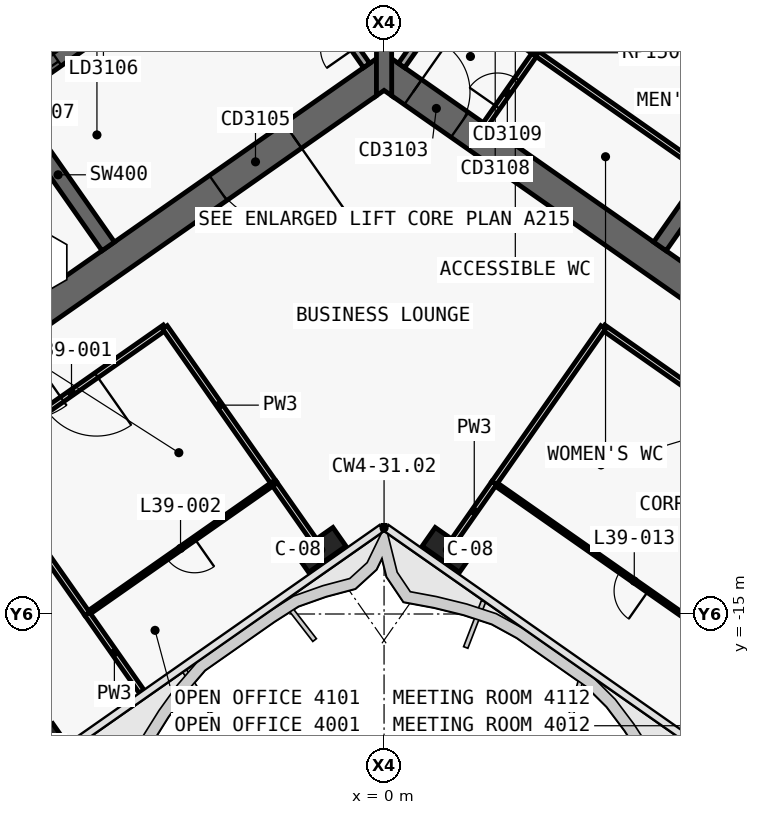
"""IFC4 building model, lengths in metres.
Left out: names, types, materials, properties, quantities, classifications, styles, units other than length and angle.
Written with IfcOpenShell. Run it as: python <this file> out.ifc"""

import sys

from ifc_helpers import new_model, si_unit, direction, frame, frame_2d, origin, origin_2d, place, context, subcontext, project, spatial, polyline, rectangle, outline, extrude, element, fill, save


model = new_model("IFC4")
c1 = context("Model", 3, precision=1e-05, world=origin(), true_north=direction((0.0, 1.0)))
c2 = subcontext(c1, "Body", "Model", "MODEL_VIEW")
j1 = project(units=[si_unit("LENGTHUNIT", "METRE"), si_unit("PLANEANGLEUNIT", "RADIAN")], contexts=[c1])
p1 = place(None, origin())
s1 = spatial("IfcSite", under=j1, at=p1, CompositionType="ELEMENT")
p2 = place(p1, origin())
s2 = spatial("IfcBuilding", under=s1, at=p2, CompositionType="ELEMENT")
p3 = place(p2, frame((0.0, 0.0, 171.0)))
s3 = spatial("IfcBuildingStorey", under=s2, at=p3, CompositionType="ELEMENT", Elevation=171.0)
p4 = place(p3, frame((0.029, 11.984, 0.0), z_axis=(0.0, 0.0, 1.0), x_axis=(-0.819151382952, -0.573577380837, 0.0)))
e1 = element("IfcWall", 1, at=p4, inside=s3, PredefinedType="SHEAR", context=c2, shape_type="SweptSolid", body=[
    extrude(outline(polyline([(33.898, 0.4), (0.56, 0.4), (-0.0, -0.4), (33.898, -0.4), (33.898, 0.4)])), origin(), (0.0, 0.0, 1.0), 3.9),
])
p5 = place(p3, frame((0.029, -0.712, 0.0), z_axis=(0.0, 0.0, 1.0), x_axis=(-0.819151758019, -0.573576845187, 0.0)))
e2 = element("IfcWall", 2, at=p5, inside=s3, PredefinedType="SHEAR", context=c2, shape_type="SweptSolid", body=[
    extrude(outline(polyline([(26.616, 0.4), (0.56, 0.4), (-0.0, -0.4), (26.616, -0.4), (26.616, 0.4)])), origin(), (0.0, 0.0, 1.0), 3.9),
])
p6 = place(p5, frame((2.966, 0.0, 0.0)))
e3 = element("IfcOpeningElement", 3, at=p6, cuts=e2, PredefinedType="OPENING", context=c2, shape_type="SweptSolid", body=[
    extrude(rectangle(XDim=2.4, YDim=2.1, at=frame_2d((1.2, 1.05))), frame((0.0, 0.41, 0.0), z_axis=(0.0, -1.0, 0.0), x_axis=(1.0, 0.0, 0.0)), (0.0, 0.0, 1.0), 0.82),
])
p7 = place(p5, frame((11.916, 0.0, 0.0)))
e4 = element("IfcOpeningElement", 4, at=p7, cuts=e2, PredefinedType="OPENING", context=c2, shape_type="SweptSolid", body=[
    extrude(rectangle(XDim=2.4, YDim=2.1, at=frame_2d((1.2, 1.05))), frame((0.0, 0.41, 0.0), z_axis=(0.0, -1.0, 0.0), x_axis=(1.0, 0.0, 0.0)), (0.0, 0.0, 1.0), 0.82),
])
p8 = place(p3, frame((-7.258, -5.326, 0.0), z_axis=(0.0, 0.0, 1.0), x_axis=(-0.573540709186, 0.819177059558, 0.0)))
e5 = element("IfcWall", 5, at=p8, inside=s3, PredefinedType="SHEAR", context=c2, shape_type="SweptSolid", body=[
    extrude(outline(polyline([(4.6, 0.2), (-0.0, 0.2), (-0.0, -0.2), (4.6, -0.2), (4.6, 0.2)])), origin(), (0.0, 0.0, 1.0), 3.9),
])
p9 = place(p3, frame((-2.638, 3.768, 0.0), z_axis=(0.0, 0.0, 1.0), x_axis=(-0.81915267502, -0.573575535572, 0.0)))
e6 = element("IfcWall", 6, at=p9, inside=s3, PredefinedType="SHEAR", context=c2, shape_type="SweptSolid", body=[
    extrude(outline(polyline([(26.2, 0.2), (0.0, 0.2), (0.0, -0.2), (26.2, -0.2), (26.2, 0.2)])), origin(), (0.0, 0.0, 1.0), 3.9),
])
p10 = place(p9, frame((1.169, 0.0, 0.0)))
e7 = element("IfcOpeningElement", 7, at=p10, cuts=e6, PredefinedType="OPENING", context=c2, shape_type="SweptSolid", body=[
    extrude(rectangle(XDim=1.1, YDim=2.1, at=frame_2d((0.55, 1.05))), frame((0.0, 0.21, 0.0), z_axis=(0.0, -1.0, 0.0), x_axis=(1.0, 0.0, 0.0)), (0.0, 0.0, 1.0), 0.42),
])
p11 = place(p9, frame((3.206, 0.0, 0.0)))
e8 = element("IfcOpeningElement", 8, at=p11, cuts=e6, PredefinedType="OPENING", context=c2, shape_type="SweptSolid", body=[
    extrude(rectangle(XDim=1.1, YDim=2.1, at=frame_2d((0.55, 1.05))), frame((0.0, 0.21, 0.0), z_axis=(0.0, -1.0, 0.0), x_axis=(1.0, 0.0, 0.0)), (0.0, 0.0, 1.0), 0.42),
])
p12 = place(p9, frame((5.244, 0.0, 0.0)))
e9 = element("IfcOpeningElement", 9, at=p12, cuts=e6, PredefinedType="OPENING", context=c2, shape_type="SweptSolid", body=[
    extrude(rectangle(XDim=1.1, YDim=2.1, at=frame_2d((0.55, 1.05))), frame((0.0, 0.21, 0.0), z_axis=(0.0, -1.0, 0.0), x_axis=(1.0, 0.0, 0.0)), (0.0, 0.0, 1.0), 0.42),
])
p13 = place(p9, frame((7.281, 0.0, 0.0)))
e10 = element("IfcOpeningElement", 10, at=p13, cuts=e6, PredefinedType="OPENING", context=c2, shape_type="SweptSolid", body=[
    extrude(rectangle(XDim=1.1, YDim=2.1, at=frame_2d((0.55, 1.05))), frame((0.0, 0.21, 0.0), z_axis=(0.0, -1.0, 0.0), x_axis=(1.0, 0.0, 0.0)), (0.0, 0.0, 1.0), 0.42),
])
p14 = place(p9, frame((9.688, 0.0, 0.0)))
e11 = element("IfcOpeningElement", 11, at=p14, cuts=e6, PredefinedType="OPENING", context=c2, shape_type="SweptSolid", body=[
    extrude(rectangle(XDim=1.1, YDim=2.1, at=frame_2d((0.55, 1.05))), frame((0.0, 0.21, 0.0), z_axis=(0.0, -1.0, 0.0), x_axis=(1.0, 0.0, 0.0)), (0.0, 0.0, 1.0), 0.42),
])
p15 = place(p9, frame((11.863, 0.0, 0.0)))
e12 = element("IfcOpeningElement", 12, at=p15, cuts=e6, PredefinedType="OPENING", context=c2, shape_type="SweptSolid", body=[
    extrude(rectangle(XDim=1.1, YDim=2.1, at=frame_2d((0.55, 1.05))), frame((0.0, 0.21, 0.0), z_axis=(0.0, -1.0, 0.0), x_axis=(1.0, 0.0, 0.0)), (0.0, 0.0, 1.0), 0.42),
])
p16 = place(p9, frame((14.038, 0.0, 0.0)))
e13 = element("IfcOpeningElement", 13, at=p16, cuts=e6, PredefinedType="OPENING", context=c2, shape_type="SweptSolid", body=[
    extrude(rectangle(XDim=1.1, YDim=2.1, at=frame_2d((0.55, 1.05))), frame((0.0, 0.21, 0.0), z_axis=(0.0, -1.0, 0.0), x_axis=(1.0, 0.0, 0.0)), (0.0, 0.0, 1.0), 0.42),
])
p17 = place(p9, frame((16.212, 0.0, 0.0)))
e14 = element("IfcOpeningElement", 14, at=p17, cuts=e6, PredefinedType="OPENING", context=c2, shape_type="SweptSolid", body=[
    extrude(rectangle(XDim=1.1, YDim=2.1, at=frame_2d((0.55, 1.05))), frame((0.0, 0.21, 0.0), z_axis=(0.0, -1.0, 0.0), x_axis=(1.0, 0.0, 0.0)), (0.0, 0.0, 1.0), 0.42),
])
p18 = place(p3, frame((-0.029, 11.984, 0.0), z_axis=(0.0, 0.0, 1.0), x_axis=(0.819151382952, -0.573577380837, 0.0)))
e15 = element("IfcWall", 15, at=p18, inside=s3, PredefinedType="SHEAR", context=c2, shape_type="SweptSolid", body=[
    extrude(outline(polyline([(33.898, 0.4), (-0.0, 0.4), (0.56, -0.4), (33.898, -0.4), (33.898, 0.4)])), origin(), (0.0, 0.0, 1.0), 3.9),
])
p19 = place(p3, frame((-0.029, -0.712, 0.0), z_axis=(0.0, 0.0, 1.0), x_axis=(0.819151758019, -0.573576845187, 0.0)))
e16 = element("IfcWall", 16, at=p19, inside=s3, PredefinedType="SHEAR", context=c2, shape_type="SweptSolid", body=[
    extrude(outline(polyline([(26.616, 0.4), (-0.0, 0.4), (0.56, -0.4), (26.616, -0.4), (26.616, 0.4)])), origin(), (0.0, 0.0, 1.0), 3.9),
])
p20 = place(p19, frame((0.966, 0.0, 0.0)))
e17 = element("IfcOpeningElement", 17, at=p20, cuts=e16, PredefinedType="OPENING", context=c2, shape_type="SweptSolid", body=[
    extrude(rectangle(XDim=1.5, YDim=2.1, at=frame_2d((0.75, 1.05))), frame((0.0, 0.41, 0.0), z_axis=(0.0, -1.0, 0.0), x_axis=(1.0, 0.0, 0.0)), (0.0, 0.0, 1.0), 0.82),
])
p21 = place(p19, frame((12.366, 0.0, 0.0)))
e18 = element("IfcOpeningElement", 18, at=p21, cuts=e16, PredefinedType="OPENING", context=c2, shape_type="SweptSolid", body=[
    extrude(rectangle(XDim=1.5, YDim=2.1, at=frame_2d((0.75, 1.05))), frame((0.0, 0.41, 0.0), z_axis=(0.0, -1.0, 0.0), x_axis=(1.0, 0.0, 0.0)), (0.0, 0.0, 1.0), 0.82),
])
p22 = place(p3, frame((7.258, -5.326, 0.0), z_axis=(0.0, 0.0, 1.0), x_axis=(0.573540709186, 0.819177059558, 0.0)))
e19 = element("IfcWall", 19, at=p22, inside=s3, PredefinedType="SHEAR", context=c2, shape_type="SweptSolid", body=[
    extrude(outline(polyline([(-0.0, 0.2), (-0.0, -0.2), (4.6, -0.2), (4.6, 0.2), (-0.0, 0.2)])), origin(), (0.0, 0.0, 1.0), 3.9),
])
p23 = place(p3, frame((2.638, 3.768, 0.0), z_axis=(0.0, 0.0, 1.0), x_axis=(0.81915267502, -0.573575535572, 0.0)))
e20 = element("IfcWall", 20, at=p23, inside=s3, PredefinedType="SHEAR", context=c2, shape_type="SweptSolid", body=[
    extrude(outline(polyline([(0.0, 0.2), (0.0, -0.2), (26.2, -0.2), (26.2, 0.2), (0.0, 0.2)])), origin(), (0.0, 0.0, 1.0), 3.9),
])
p24 = place(p23, frame((9.637, 0.0, 0.0)))
e21 = element("IfcOpeningElement", 21, at=p24, cuts=e20, PredefinedType="OPENING", context=c2, shape_type="SweptSolid", body=[
    extrude(rectangle(XDim=1.2, YDim=2.1, at=frame_2d((0.6, 1.05))), frame((0.0, 0.21, 0.0), z_axis=(0.0, -1.0, 0.0), x_axis=(1.0, 0.0, 0.0)), (0.0, 0.0, 1.0), 0.42),
])
p25 = place(p23, frame((11.812, 0.0, 0.0)))
e22 = element("IfcOpeningElement", 22, at=p25, cuts=e20, PredefinedType="OPENING", context=c2, shape_type="SweptSolid", body=[
    extrude(rectangle(XDim=1.2, YDim=2.1, at=frame_2d((0.6, 1.05))), frame((0.0, 0.21, 0.0), z_axis=(0.0, -1.0, 0.0), x_axis=(1.0, 0.0, 0.0)), (0.0, 0.0, 1.0), 0.42),
])
p26 = place(p23, frame((13.988, 0.0, 0.0)))
e23 = element("IfcOpeningElement", 23, at=p26, cuts=e20, PredefinedType="OPENING", context=c2, shape_type="SweptSolid", body=[
    extrude(rectangle(XDim=1.2, YDim=2.1, at=frame_2d((0.6, 1.05))), frame((0.0, 0.21, 0.0), z_axis=(0.0, -1.0, 0.0), x_axis=(1.0, 0.0, 0.0)), (0.0, 0.0, 1.0), 0.42),
])
p27 = place(p23, frame((16.262, 0.0, 0.0)))
e24 = element("IfcOpeningElement", 24, at=p27, cuts=e20, PredefinedType="OPENING", context=c2, shape_type="SweptSolid", body=[
    extrude(rectangle(XDim=1.0, YDim=2.1, at=frame_2d((0.5, 1.05))), frame((0.0, 0.21, 0.0), z_axis=(0.0, -1.0, 0.0), x_axis=(1.0, 0.0, 0.0)), (0.0, 0.0, 1.0), 0.42),
])
p28 = place(p3, frame((0.0, -1.361, 0.0), z_axis=(0.0, 0.0, 1.0), x_axis=(0.0, 1.0, 0.0)))
e25 = element("IfcWall", 25, at=p28, inside=s3, PredefinedType="SHEAR", context=c2, shape_type="SweptSolid", body=[
    extrude(outline(polyline([(0.0, -0.2), (0.14, -0.2), (1.075, -0.2), (12.696, -0.2), (13.813, -0.2), (13.893, -0.2), (13.933, -0.172), (13.813, 0.0), (13.933, 0.172), (13.893, 0.2), (13.813, 0.2), (12.696, 0.2), (1.075, 0.2), (0.14, 0.2), (0.0, 0.2), (0.14, 0.0), (0.0, -0.2)])), origin(), (0.0, 0.0, 1.0), 3.9),
])
for number, where, z_axis, x_axis in (
    (26, (-1.665, -13.313, 0.0), (0.0, 0.0, 1.0), (-0.819, -0.574, 0.0)),
    (27, (-9.038, -18.475, 0.0), (0.0, 0.0, 1.0), (-0.819, -0.574, 0.0)),
    (28, (1.665, -13.313, 0.0), (0.0, 0.0, 1.0), (0.819, -0.574, 0.0)),
):
    element("IfcColumn", number, at=place(p3, frame(where, z_axis=z_axis, x_axis=x_axis)), inside=s3, PredefinedType="COLUMN", context=c2, shape_type="SweptSolid", body=[
        extrude(rectangle(XDim=1.2, YDim=0.6, at=origin_2d()), origin(), (0.0, 0.0, 1.0), 3.9),
    ])
p29 = place(p3, frame((2.67, -2.114, 0.0), z_axis=(0.0, 0.0, 1.0), x_axis=(0.573576324356, 0.819152122709, 0.0)))
e29 = element("IfcWall", 29, at=p29, inside=s3, PredefinedType="PARTITIONING", context=c2, shape_type="SweptSolid", body=[
    extrude(rectangle(XDim=4.6, YDim=0.15, at=frame_2d((2.3, 0.0))), origin(), (0.0, 0.0, 1.0), 3.62),
])
p30 = place(p29, frame((0.55, 0.0, 0.0)))
e30 = element("IfcOpeningElement", 30, at=p30, cuts=e29, PredefinedType="OPENING", context=c2, shape_type="SweptSolid", body=[
    extrude(rectangle(XDim=0.9, YDim=2.1, at=frame_2d((0.45, 1.05))), frame((0.0, 0.085, 0.0), z_axis=(0.0, -1.0, 0.0), x_axis=(1.0, 0.0, 0.0)), (0.0, 0.0, 1.0), 0.17),
])
p31 = place(p29, frame((2.95, 0.0, 0.0)))
e31 = element("IfcOpeningElement", 31, at=p31, cuts=e29, PredefinedType="OPENING", context=c2, shape_type="SweptSolid", body=[
    extrude(rectangle(XDim=0.9, YDim=2.1, at=frame_2d((0.45, 1.05))), frame((0.0, 0.085, 0.0), z_axis=(0.0, -1.0, 0.0), x_axis=(1.0, 0.0, 0.0)), (0.0, 0.0, 1.0), 0.17),
])
p32 = place(p3, frame((1.86, 1.261, 0.0), z_axis=(0.0, 0.0, 1.0), x_axis=(0.819103967032, -0.573645091666, 0.0)))
e32 = element("IfcWall", 32, at=p32, inside=s3, PredefinedType="PARTITIONING", context=c2, shape_type="SweptSolid", body=[
    extrude(rectangle(XDim=2.6, YDim=0.15, at=frame_2d((1.3, 0.0))), origin(), (0.0, 0.0, 1.0), 3.62),
])
p33 = place(p32, frame((0.85, 0.0, 0.0)))
e33 = element("IfcOpeningElement", 33, at=p33, cuts=e32, PredefinedType="OPENING", context=c2, shape_type="SweptSolid", body=[
    extrude(rectangle(XDim=0.9, YDim=2.1, at=frame_2d((0.45, 1.05))), frame((0.0, 0.085, 0.0), z_axis=(0.0, -1.0, 0.0), x_axis=(1.0, 0.0, 0.0)), (0.0, 0.0, 1.0), 0.17),
])
p34 = place(p3, frame((3.99, -0.23, 0.0), z_axis=(0.0, 0.0, 1.0), x_axis=(0.819153326956, -0.573574604508, 0.0)))
e34 = element("IfcWall", 34, at=p34, inside=s3, PredefinedType="PARTITIONING", context=c2, shape_type="SweptSolid", body=[
    extrude(rectangle(XDim=5.4, YDim=0.15, at=frame_2d((2.7, 0.0))), origin(), (0.0, 0.0, 1.0), 3.62),
])
p35 = place(p3, frame((-0.459, -0.565, 0.0), z_axis=(0.0, 0.0, 1.0), x_axis=(-0.573576324356, 0.819152122709, 0.0)))
e35 = element("IfcWall", 35, at=p35, inside=s3, PredefinedType="SOLIDWALL", context=c2, shape_type="SweptSolid", body=[
    extrude(rectangle(XDim=4.6, YDim=0.2, at=frame_2d((2.3, 0.0))), origin(), (0.0, 0.0, 1.0), 3.62),
])
p36 = place(p35, frame((0.55, 0.0, 0.0)))
e36 = element("IfcOpeningElement", 36, at=p36, cuts=e35, PredefinedType="OPENING", context=c2, shape_type="SweptSolid", body=[
    extrude(rectangle(XDim=0.9, YDim=2.1, at=frame_2d((0.45, 1.05))), frame((0.0, 0.11, 0.0), z_axis=(0.0, -1.0, 0.0), x_axis=(1.0, 0.0, 0.0)), (0.0, 0.0, 1.0), 0.22),
])
p37 = place(p3, frame((0.459, -0.565, 0.0), z_axis=(0.0, 0.0, 1.0), x_axis=(0.573576324356, 0.819152122709, 0.0)))
e37 = element("IfcWall", 37, at=p37, inside=s3, PredefinedType="SOLIDWALL", context=c2, shape_type="SweptSolid", body=[
    extrude(rectangle(XDim=4.6, YDim=0.2, at=frame_2d((2.3, 0.0))), origin(), (0.0, 0.0, 1.0), 3.62),
])
p38 = place(p37, frame((0.55, 0.0, 0.0)))
e38 = element("IfcOpeningElement", 38, at=p38, cuts=e37, PredefinedType="OPENING", context=c2, shape_type="SweptSolid", body=[
    extrude(rectangle(XDim=0.9, YDim=2.1, at=frame_2d((0.45, 1.05))), frame((0.0, 0.11, 0.0), z_axis=(0.0, -1.0, 0.0), x_axis=(1.0, 0.0, 0.0)), (0.0, 0.0, 1.0), 0.22),
])
p39 = place(p3, frame((13.14, -12.619, 0.0), z_axis=(0.0, 0.0, 1.0), x_axis=(-0.81915291695, 0.57357519006, 0.0)))
e39 = element("IfcWall", 39, at=p39, inside=s3, PredefinedType="PARTITIONING", context=c2, shape_type="SweptSolid", body=[
    extrude(rectangle(XDim=9.002, YDim=0.15, at=frame_2d((4.501, 0.0))), origin(), (0.0, 0.0, 1.0), 3.0),
])
p40 = place(p39, frame((3.701, 0.0, 0.0)))
e40 = element("IfcOpeningElement", 40, at=p40, cuts=e39, PredefinedType="OPENING", context=c2, shape_type="SweptSolid", body=[
    extrude(rectangle(XDim=1.6, YDim=2.1, at=frame_2d((0.8, 1.05))), frame((0.0, 0.085, 0.0), z_axis=(0.0, -1.0, 0.0), x_axis=(1.0, 0.0, 0.0)), (0.0, 0.0, 1.0), 0.17),
])
p41 = place(p3, frame((-5.766, -7.456, 0.0), z_axis=(0.0, 0.0, 1.0), x_axis=(-0.819147828287, -0.573582457378, 0.0)))
e41 = element("IfcWall", 41, at=p41, inside=s3, PredefinedType="PARTITIONING", context=c2, shape_type="SweptSolid", body=[
    extrude(rectangle(XDim=6.002, YDim=0.15, at=frame_2d((3.001, 0.0))), origin(), (0.0, 0.0, 1.0), 3.0),
])
p42 = place(p41, frame((2.201, 0.0, 0.0)))
e42 = element("IfcOpeningElement", 42, at=p42, cuts=e41, PredefinedType="OPENING", context=c2, shape_type="SweptSolid", body=[
    extrude(rectangle(XDim=1.6, YDim=2.1, at=frame_2d((0.8, 1.05))), frame((0.0, 0.085, 0.0), z_axis=(0.0, -1.0, 0.0), x_axis=(1.0, 0.0, 0.0)), (0.0, 0.0, 1.0), 0.17),
])
p43 = place(p3, frame((10.27, -16.715, 0.0), z_axis=(0.0, 0.0, 1.0), x_axis=(-0.819154173185, 0.573573395961, 0.0)))
e43 = element("IfcWall", 43, at=p43, inside=s3, PredefinedType="PARTITIONING", context=c2, shape_type="SweptSolid", body=[
    extrude(rectangle(XDim=9.0, YDim=0.1, at=frame_2d((4.5, 0.0))), origin(), (0.0, 0.0, 1.0), 3.0),
])
p44 = place(p43, frame((4.05, 0.0, 0.0)))
e44 = element("IfcOpeningElement", 44, at=p44, cuts=e43, PredefinedType="OPENING", context=c2, shape_type="SweptSolid", body=[
    extrude(rectangle(XDim=0.9, YDim=2.1, at=frame_2d((0.45, 1.05))), frame((0.0, 0.06, 0.0), z_axis=(0.0, -1.0, 0.0), x_axis=(1.0, 0.0, 0.0)), (0.0, 0.0, 1.0), 0.12),
])
p45 = place(p3, frame((1.849, -13.051, 0.0), z_axis=(0.0, 0.0, 1.0), x_axis=(0.573623601139, 0.819119017125, 0.0)))
e45 = element("IfcWall", 45, at=p45, inside=s3, PredefinedType="PARTITIONING", context=c2, shape_type="SweptSolid", body=[
    extrude(rectangle(XDim=1.829, YDim=0.15, at=frame_2d((0.915, 0.0))), origin(), (0.0, 0.0, 1.0), 3.0),
])
p46 = place(p3, frame((2.898, -11.552, 0.0), z_axis=(0.0, 0.0, 1.0), x_axis=(0.573586866468, 0.819144740944, 0.0)))
e46 = element("IfcWall", 46, at=p46, inside=s3, PredefinedType="PARTITIONING", context=c2, shape_type="SweptSolid", body=[
    extrude(rectangle(XDim=5.0, YDim=0.15, at=frame_2d((2.5, 0.0))), origin(), (0.0, 0.0, 1.0), 3.0),
])
p47 = place(p3, frame((-1.849, -13.051, 0.0), z_axis=(0.0, 0.0, 1.0), x_axis=(-0.573542889209, 0.819175533227, 0.0)))
e47 = element("IfcWall", 47, at=p47, inside=s3, PredefinedType="PARTITIONING", context=c2, shape_type="SweptSolid", body=[
    extrude(rectangle(XDim=1.831, YDim=0.15, at=frame_2d((0.916, 0.0))), origin(), (0.0, 0.0, 1.0), 3.0),
])
p48 = place(p3, frame((-2.897, -11.553, 0.0), z_axis=(0.0, 0.0, 1.0), x_axis=(-0.573593309886, 0.819140229054, 0.0)))
e48 = element("IfcWall", 48, at=p48, inside=s3, PredefinedType="PARTITIONING", context=c2, shape_type="SweptSolid", body=[
    extrude(rectangle(XDim=5.004, YDim=0.15, at=frame_2d((2.502, 0.0))), origin(), (0.0, 0.0, 1.0), 3.0),
])
p49 = place(p3, frame((-2.898, -11.552, 0.0), z_axis=(0.0, 0.0, 1.0), x_axis=(-0.819149710902, -0.573579768758, 0.0)))
e49 = element("IfcWall", 49, at=p49, inside=s3, PredefinedType="PARTITIONING", context=c2, shape_type="SweptSolid", body=[
    extrude(rectangle(XDim=6.0, YDim=0.1, at=frame_2d((3.0, 0.0))), origin(), (0.0, 0.0, 1.0), 3.0),
])
p50 = place(p49, frame((2.55, 0.0, 0.0)))
e50 = element("IfcOpeningElement", 50, at=p50, cuts=e49, PredefinedType="OPENING", context=c2, shape_type="SweptSolid", body=[
    extrude(rectangle(XDim=0.9, YDim=2.1, at=frame_2d((0.45, 1.05))), frame((0.0, 0.06, 0.0), z_axis=(0.0, -1.0, 0.0), x_axis=(1.0, 0.0, 0.0)), (0.0, 0.0, 1.0), 0.12),
])
p51 = place(p3, frame((-6.379, -17.041, 0.0), z_axis=(0.0, 0.0, 1.0), x_axis=(-0.573560689761, 0.819163069945, 0.0)))
e51 = element("IfcWall", 51, at=p51, inside=s3, PredefinedType="PARTITIONING", context=c2, shape_type="SweptSolid", body=[
    extrude(rectangle(XDim=2.499, YDim=0.15, at=frame_2d((1.25, 0.0))), origin(), (0.0, 0.0, 1.0), 2.9),
])
p52 = place(p3, frame((-7.813, -14.993, 0.0), z_axis=(0.0, 0.0, 1.0), x_axis=(-0.573586866468, 0.819144740944, 0.0)))
e52 = element("IfcWall", 52, at=p52, inside=s3, PredefinedType="PARTITIONING", context=c2, shape_type="SweptSolid", body=[
    extrude(rectangle(XDim=5.0, YDim=0.15, at=frame_2d((2.5, 0.0))), origin(), (0.0, 0.0, 1.0), 3.62),
])
p53 = place(p13, origin())
e53 = element("IfcDoor", 53, at=p53, inside=s3, OperationType="SLIDING_TO_RIGHT", PredefinedType="DOOR", context=c2, shape_type="SweptSolid", body=[
    extrude(rectangle(XDim=1.1, YDim=2.1, at=frame_2d((0.55, 1.05))), frame((0.0, 0.025, 0.0), z_axis=(0.0, -1.0, 0.0), x_axis=(1.0, 0.0, 0.0)), (0.0, 0.0, 1.0), 0.05),
])
fill(e10, e53)
p54 = place(p6, origin())
e54 = element("IfcDoor", 54, at=p54, inside=s3, OperationType="DOUBLE_DOOR_SINGLE_SWING", PredefinedType="DOOR", context=c2, shape_type="SweptSolid", body=[
    extrude(rectangle(XDim=2.4, YDim=2.1, at=frame_2d((1.2, 1.05))), frame((0.0, 0.025, 0.0), z_axis=(0.0, -1.0, 0.0), x_axis=(1.0, 0.0, 0.0)), (0.0, 0.0, 1.0), 0.05),
])
fill(e3, e54)
p55 = place(p30, origin())
e55 = element("IfcDoor", 55, at=p55, inside=s3, OperationType="SINGLE_SWING_RIGHT", PredefinedType="DOOR", context=c2, shape_type="SweptSolid", body=[
    extrude(rectangle(XDim=0.9, YDim=2.1, at=frame_2d((0.45, 1.05))), frame((0.0, 0.025, 0.0), z_axis=(0.0, -1.0, 0.0), x_axis=(1.0, 0.0, 0.0)), (0.0, 0.0, 1.0), 0.05),
])
fill(e30, e55)
p56 = place(p20, origin())
e56 = element("IfcDoor", 56, at=p56, inside=s3, OperationType="SINGLE_SWING_RIGHT", PredefinedType="DOOR", context=c2, shape_type="SweptSolid", body=[
    extrude(rectangle(XDim=1.5, YDim=2.1, at=frame_2d((0.75, 1.05))), frame((0.0, 0.025, 0.0), z_axis=(0.0, -1.0, 0.0), x_axis=(1.0, 0.0, 0.0)), (0.0, 0.0, 1.0), 0.05),
])
fill(e17, e56)
p57 = place(p42, origin())
e57 = element("IfcDoor", 57, at=p57, inside=s3, OperationType="DOUBLE_DOOR_SINGLE_SWING", PredefinedType="DOOR", context=c2, shape_type="SweptSolid", body=[
    extrude(rectangle(XDim=1.6, YDim=2.1, at=frame_2d((0.8, 1.05))), frame((0.0, 0.025, 0.0), z_axis=(0.0, -1.0, 0.0), x_axis=(1.0, 0.0, 0.0)), (0.0, 0.0, 1.0), 0.05),
])
fill(e42, e57)
p58 = place(p50, origin())
e58 = element("IfcDoor", 58, at=p58, inside=s3, OperationType="SINGLE_SWING_RIGHT", PredefinedType="DOOR", context=c2, shape_type="SweptSolid", body=[
    extrude(rectangle(XDim=0.9, YDim=2.1, at=frame_2d((0.45, 1.05))), frame((0.0, 0.025, 0.0), z_axis=(0.0, -1.0, 0.0), x_axis=(1.0, 0.0, 0.0)), (0.0, 0.0, 1.0), 0.05),
])
fill(e50, e58)
p59 = place(p44, origin())
e59 = element("IfcDoor", 59, at=p59, inside=s3, OperationType="SINGLE_SWING_RIGHT", PredefinedType="DOOR", context=c2, shape_type="SweptSolid", body=[
    extrude(rectangle(XDim=0.9, YDim=2.1, at=frame_2d((0.45, 1.05))), frame((0.0, 0.025, 0.0), z_axis=(0.0, -1.0, 0.0), x_axis=(1.0, 0.0, 0.0)), (0.0, 0.0, 1.0), 0.05),
])
fill(e44, e59)
save(model, sys.argv[1])
